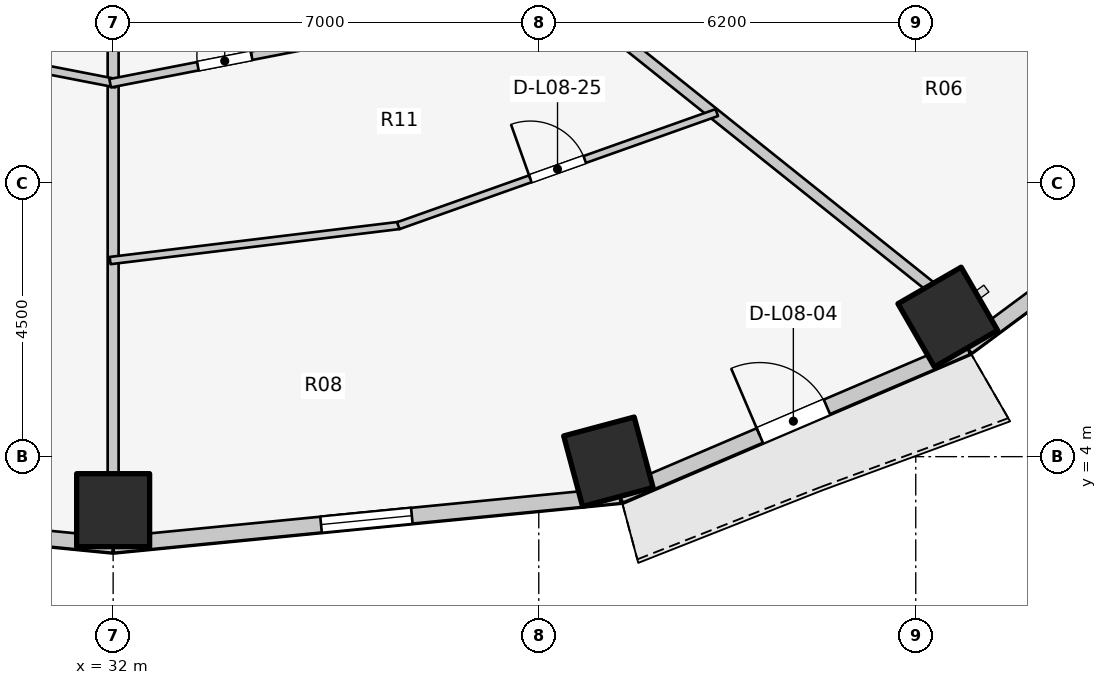
"""IFC4 building model, lengths in metres.
Left out: names, types, materials, properties, quantities, classifications, styles, units other than length and angle.
Written with IfcOpenShell. Run it as: python <this file> out.ifc"""

import sys

from ifc_helpers import new_model, si_unit, direction, frame, frame_2d, origin, origin_2d, place, context, subcontext, project, spatial, rectangle, extrude, element, fill, save


model = new_model("IFC4")
c1 = context("Model", 3, precision=1e-05, world=origin(), true_north=direction((0.0, 1.0)))
c2 = subcontext(c1, "Body", "Model", "MODEL_VIEW")
j1 = project(units=[si_unit("LENGTHUNIT", "METRE"), si_unit("PLANEANGLEUNIT", "RADIAN")], contexts=[c1])
p1 = place(None, origin())
s1 = spatial("IfcSite", under=j1, at=p1, CompositionType="ELEMENT")
p2 = place(p1, origin())
s2 = spatial("IfcBuilding", under=s1, at=p2, CompositionType="ELEMENT")
p3 = place(p2, frame((0.0, 0.0, 30.7)))
s3 = spatial("IfcBuildingStorey", under=s2, at=p3, CompositionType="ELEMENT", Elevation=30.7)
for number, where, z_axis, x_axis in (
    (1, (32.0, 3.12, 0.0), (0.0, 0.0, 1.0), (0.0, -1.0, 0.0)),
    (2, (40.145, 3.916, 0.0), (0.0, 0.0, 1.0), (0.259, -0.966, 0.0)),
    (3, (45.727, 6.296, 0.0), (0.0, 0.0, 1.0), (0.5, -0.866, 0.0)),
):
    element("IfcColumn", number, at=place(p3, frame(where, z_axis=z_axis, x_axis=x_axis)), inside=s3, PredefinedType="COLUMN", context=c2, shape_type="SweptSolid", body=[
        extrude(rectangle(XDim=1.2, YDim=1.2, at=origin_2d()), origin(), (0.0, 0.0, 1.0), 3.1),
    ])
p4 = place(p3, frame((23.668, 3.364, 0.0), z_axis=(0.0, 0.0, 1.0), x_axis=(0.995247718352, -0.097375454379, 0.0)))
e4 = element("IfcWall", 4, at=p4, inside=s3, PredefinedType="STANDARD", context=c2, shape_type="SweptSolid", body=[
    extrude(rectangle(XDim=8.372, YDim=0.26, at=frame_2d((4.186, 0.0))), origin(), (0.0, 0.0, 1.0), 2.85),
])
p5 = place(p4, frame((3.436, 0.0, 0.75)))
e5 = element("IfcOpeningElement", 5, at=p5, cuts=e4, PredefinedType="OPENING", context=c2, shape_type="SweptSolid", body=[
    extrude(rectangle(XDim=1.5, YDim=1.6, at=frame_2d((0.75, 0.8))), frame((0.0, 0.14, 0.0), z_axis=(0.0, -1.0, 0.0), x_axis=(1.0, 0.0, 0.0)), (0.0, 0.0, 1.0), 0.28),
])
p6 = place(p3, frame((32.0, 2.549, 0.0), z_axis=(0.0, 0.0, 1.0), x_axis=(0.995247718352, 0.097375454379, 0.0)))
e6 = element("IfcWall", 6, at=p6, inside=s3, PredefinedType="STANDARD", context=c2, shape_type="SweptSolid", body=[
    extrude(rectangle(XDim=8.372, YDim=0.26, at=frame_2d((4.186, 0.0))), origin(), (0.0, 0.0, 1.0), 2.85),
])
p7 = place(p6, frame((3.436, 0.0, 0.75)))
e7 = element("IfcOpeningElement", 7, at=p7, cuts=e6, PredefinedType="OPENING", context=c2, shape_type="SweptSolid", body=[
    extrude(rectangle(XDim=1.5, YDim=1.6, at=frame_2d((0.75, 0.8))), frame((0.0, 0.14, 0.0), z_axis=(0.0, -1.0, 0.0), x_axis=(1.0, 0.0, 0.0)), (0.0, 0.0, 1.0), 0.28),
])
p8 = place(p3, frame((40.332, 3.364, 0.0), z_axis=(0.0, 0.0, 1.0), x_axis=(0.919612132394, 0.39282760335, 0.0)))
e8 = element("IfcWall", 8, at=p8, inside=s3, PredefinedType="STANDARD", context=c2, shape_type="SweptSolid", body=[
    extrude(rectangle(XDim=6.209, YDim=0.26, at=frame_2d((3.105, 0.0))), origin(), (0.0, 0.0, 1.0), 2.88),
])
p9 = place(p8, frame((2.505, 0.0, 0.0)))
e9 = element("IfcOpeningElement", 9, at=p9, cuts=e8, PredefinedType="OPENING", context=c2, shape_type="SweptSolid", body=[
    extrude(rectangle(XDim=1.2, YDim=2.2, at=frame_2d((0.6, 1.1))), frame((0.0, 0.14, 0.0), z_axis=(0.0, -1.0, 0.0), x_axis=(1.0, 0.0, 0.0)), (0.0, 0.0, 1.0), 0.28),
])
p10 = place(p3, frame((46.042, 5.803, 0.0), z_axis=(0.0, 0.0, 1.0), x_axis=(0.803477531792, 0.595335078679, 0.0)))
e10 = element("IfcWall", 10, at=p10, inside=s3, PredefinedType="STANDARD", context=c2, shape_type="SweptSolid", body=[
    extrude(rectangle(XDim=5.43, YDim=0.26, at=frame_2d((2.715, 0.0))), origin(), (0.0, 0.0, 1.0), 2.85),
])
p11 = place(p3, frame((32.0, 12.095, 0.0), z_axis=(0.0, 0.0, 1.0), x_axis=(0.0, -1.0, 0.0)))
e11 = element("IfcWall", 11, at=p11, inside=s3, PredefinedType="PARTITIONING", context=c2, shape_type="SweptSolid", body=[
    extrude(rectangle(XDim=8.395, YDim=0.18, at=frame_2d((4.198, 0.0))), origin(), (0.0, 0.0, 1.0), 2.237),
])
p12 = place(p3, frame((36.968, 13.569, 0.0), z_axis=(0.0, 0.0, 1.0), x_axis=(0.781055486744, -0.624461629428, 0.0)))
e12 = element("IfcWall", 12, at=p12, inside=s3, PredefinedType="PARTITIONING", context=c2, shape_type="SweptSolid", body=[
    extrude(rectangle(XDim=10.843, YDim=0.18, at=frame_2d((5.422, 0.0))), origin(), (0.0, 0.0, 1.0), 2.237),
])
p13 = place(p3, frame((28.28, 10.873, 0.0), z_axis=(0.0, 0.0, 1.0), x_axis=(0.981623000654, -0.190830512727, 0.0)))
e13 = element("IfcWall", 13, at=p13, inside=s3, PredefinedType="PLUMBINGWALL", context=c2, shape_type="SweptSolid", body=[
    extrude(rectangle(XDim=3.839, YDim=0.14, at=frame_2d((1.92, 0.0))), origin(), (0.0, 0.0, 1.0), 2.237),
])
p14 = place(p13, frame((1.47, 0.0, 0.0)))
e14 = element("IfcOpeningElement", 14, at=p14, cuts=e13, PredefinedType="OPENING", context=c2, shape_type="SweptSolid", body=[
    extrude(rectangle(XDim=0.9, YDim=2.1, at=frame_2d((0.45, 1.05))), frame((0.0, 0.08, 0.0), z_axis=(0.0, -1.0, 0.0), x_axis=(1.0, 0.0, 0.0)), (0.0, 0.0, 1.0), 0.16),
])
p15 = place(p3, frame((31.95, 7.225, 0.0), z_axis=(0.0, 0.0, 1.0), x_axis=(0.992699076447, 0.120617343785, 0.0)))
e15 = element("IfcWall", 15, at=p15, inside=s3, PredefinedType="MOVABLE", context=c2, shape_type="SweptSolid", body=[
    extrude(rectangle(XDim=4.793, YDim=0.12, at=frame_2d((2.396, 0.0))), origin(), (0.0, 0.0, 1.0), 2.237),
])
p16 = place(p3, frame((36.689, 7.798, 0.0), z_axis=(0.0, 0.0, 1.0), x_axis=(0.942369240096, 0.334574678243, 0.0)))
e16 = element("IfcWall", 16, at=p16, inside=s3, PredefinedType="MOVABLE", context=c2, shape_type="SweptSolid", body=[
    extrude(rectangle(XDim=5.559, YDim=0.12, at=frame_2d((2.779, 0.0))), origin(), (0.0, 0.0, 1.0), 2.237),
])
p17 = place(p16, frame((2.304, 0.0, 0.0)))
e17 = element("IfcOpeningElement", 17, at=p17, cuts=e16, PredefinedType="OPENING", context=c2, shape_type="SweptSolid", body=[
    extrude(rectangle(XDim=0.95, YDim=2.1, at=frame_2d((0.475, 1.05))), frame((0.0, 0.07, 0.0), z_axis=(0.0, -1.0, 0.0), x_axis=(1.0, 0.0, 0.0)), (0.0, 0.0, 1.0), 0.14),
])
p18 = place(p3, frame((31.951, 10.14, 0.0), z_axis=(0.0, 0.0, 1.0), x_axis=(0.981623000654, 0.190830512727, 0.0)))
e18 = element("IfcWall", 18, at=p18, inside=s3, PredefinedType="PLUMBINGWALL", context=c2, shape_type="SweptSolid", body=[
    extrude(rectangle(XDim=3.839, YDim=0.14, at=frame_2d((1.92, 0.0))), origin(), (0.0, 0.0, 1.0), 2.237),
])
p19 = place(p18, frame((1.47, 0.0, 0.0)))
e19 = element("IfcOpeningElement", 19, at=p19, cuts=e18, PredefinedType="OPENING", context=c2, shape_type="SweptSolid", body=[
    extrude(rectangle(XDim=0.9, YDim=2.1, at=frame_2d((0.45, 1.05))), frame((0.0, 0.08, 0.0), z_axis=(0.0, -1.0, 0.0), x_axis=(1.0, 0.0, 0.0)), (0.0, 0.0, 1.0), 0.16),
])
p20 = place(p7, origin())
e20 = element("IfcWindow", 20, at=p20, inside=s3, PartitioningType="SINGLE_PANEL", PredefinedType="WINDOW", context=c2, shape_type="SweptSolid", body=[
    extrude(rectangle(XDim=1.5, YDim=1.6, at=frame_2d((0.75, 0.8))), frame((0.0, 0.03, 0.0), z_axis=(0.0, -1.0, 0.0), x_axis=(1.0, 0.0, 0.0)), (0.0, 0.0, 1.0), 0.06),
])
fill(e7, e20)
p21 = place(p9, origin())
e21 = element("IfcDoor", 21, at=p21, inside=s3, OperationType="SINGLE_SWING_LEFT", PredefinedType="DOOR", context=c2, shape_type="SweptSolid", body=[
    extrude(rectangle(XDim=1.2, YDim=2.2, at=frame_2d((0.6, 1.1))), frame((0.0, 0.025, 0.0), z_axis=(0.0, -1.0, 0.0), x_axis=(1.0, 0.0, 0.0)), (0.0, 0.0, 1.0), 0.05),
])
fill(e9, e21)
p22 = place(p17, origin())
e22 = element("IfcDoor", 22, at=p22, inside=s3, OperationType="SINGLE_SWING_LEFT", PredefinedType="DOOR", context=c2, shape_type="SweptSolid", body=[
    extrude(rectangle(XDim=0.95, YDim=2.1, at=frame_2d((0.475, 1.05))), frame((0.0, 0.025, 0.0), z_axis=(0.0, -1.0, 0.0), x_axis=(1.0, 0.0, 0.0)), (0.0, 0.0, 1.0), 0.05),
])
fill(e17, e22)
p23 = place(p19, origin())
e23 = element("IfcDoor", 23, at=p23, inside=s3, OperationType="SINGLE_SWING_RIGHT", PredefinedType="DOOR", context=c2, shape_type="SweptSolid", body=[
    extrude(rectangle(XDim=0.9, YDim=2.1, at=frame_2d((0.45, 1.05))), frame((0.0, 0.025, 0.0), z_axis=(0.0, -1.0, 0.0), x_axis=(1.0, 0.0, 0.0)), (0.0, 0.0, 1.0), 0.05),
])
fill(e19, e23)
save(model, sys.argv[1])
